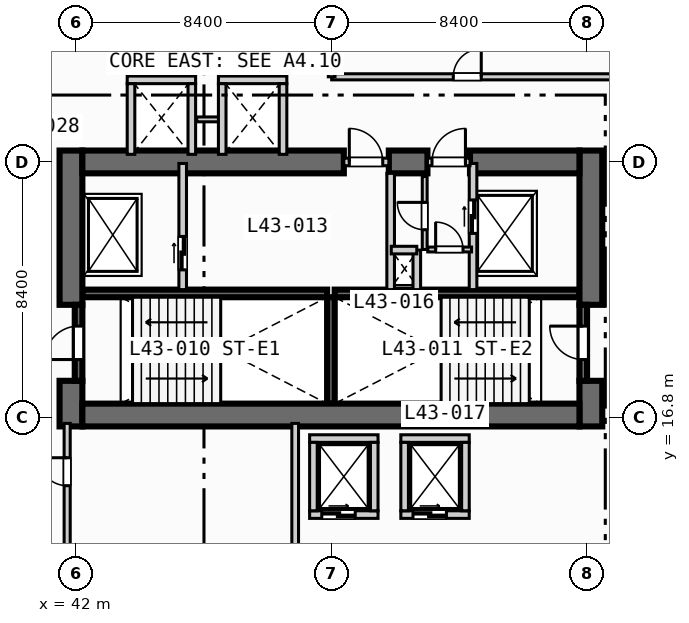
"""IFC4 building model, lengths in metres.
Left out: names, types, materials, properties, quantities, classifications, styles, units other than length and angle.
Written with IfcOpenShell. Run it as: python <this file> out.ifc"""

import sys

from ifc_helpers import new_model, si_unit, direction, frame, frame_2d, origin, place, context, subcontext, project, spatial, rectangle, extrude, element, fill, save


model = new_model("IFC4")
c1 = context("Model", 3, precision=1e-05, world=origin(), true_north=direction((0.0, 1.0)))
c2 = subcontext(c1, "Body", "Model", "MODEL_VIEW")
j1 = project(units=[si_unit("LENGTHUNIT", "METRE"), si_unit("PLANEANGLEUNIT", "RADIAN")], contexts=[c1])
p1 = place(None, origin())
s1 = spatial("IfcSite", under=j1, at=p1, CompositionType="ELEMENT")
p2 = place(p1, origin())
s2 = spatial("IfcBuilding", under=s1, at=p2, CompositionType="ELEMENT")
p3 = place(p2, frame((0.0, 0.0, 179.1)))
s3 = spatial("IfcBuildingStorey", under=s2, at=p3, CompositionType="ELEMENT", Elevation=179.1)
for number, where, z_axis, x_axis in (
    (1, (42.2, 20.875, 0.0), (0.0, 0.0, 1.0), (1.0, 0.0, 0.0)),
    (2, (50.5, 20.875, 0.0), (0.0, 0.0, 1.0), (1.0, 0.0, 0.0)),
):
    element("IfcWall", number, at=place(p3, frame(where, z_axis=z_axis, x_axis=x_axis)), inside=s3, PredefinedType="SOLIDWALL", context=c2, shape_type="SweptSolid", body=[
        extrude(rectangle(XDim=8.05, YDim=0.25, at=frame_2d((4.025, 0.0))), origin(), (0.0, 0.0, 1.0), 3.47),
    ])
p4 = place(p3, frame((50.375, 17.25, 0.0), z_axis=(0.0, 0.0, 1.0), x_axis=(0.0, 1.0, 0.0)))
e3 = element("IfcWall", 3, at=p4, inside=s3, PredefinedType="SOLIDWALL", context=c2, shape_type="SweptSolid", body=[
    extrude(rectangle(XDim=3.5, YDim=0.25, at=frame_2d((1.75, 0.0))), origin(), (0.0, 0.0, 1.0), 3.47),
])
p5 = place(p3, frame((41.825, 16.5, 0.0), z_axis=(0.0, 0.0, 1.0), x_axis=(0.0, 1.0, 0.0)))
e4 = element("IfcWall", 4, at=p5, inside=s3, PredefinedType="SHEAR", context=c2, shape_type="SweptSolid", body=[
    extrude(rectangle(XDim=1.5, YDim=0.75, at=frame_2d((0.75, 0.0))), origin(), (0.0, 0.0, 1.0), 3.47),
])
p6 = place(p3, frame((41.825, 20.5, 0.0), z_axis=(0.0, 0.0, 1.0), x_axis=(0.0, 1.0, 0.0)))
e5 = element("IfcWall", 5, at=p6, inside=s3, PredefinedType="SHEAR", context=c2, shape_type="SweptSolid", body=[
    extrude(rectangle(XDim=5.075, YDim=0.75, at=frame_2d((2.538, 0.0))), origin(), (0.0, 0.0, 1.0), 3.47),
])
p7 = place(p3, frame((58.925, 16.5, 0.0), z_axis=(0.0, 0.0, 1.0), x_axis=(0.0, 1.0, 0.0)))
e6 = element("IfcWall", 6, at=p7, inside=s3, PredefinedType="SHEAR", context=c2, shape_type="SweptSolid", body=[
    extrude(rectangle(XDim=1.5, YDim=0.75, at=frame_2d((0.75, 0.0))), origin(), (0.0, 0.0, 1.0), 3.47),
])
p8 = place(p3, frame((58.925, 20.5, 0.0), z_axis=(0.0, 0.0, 1.0), x_axis=(0.0, 1.0, 0.0)))
e7 = element("IfcWall", 7, at=p8, inside=s3, PredefinedType="SHEAR", context=c2, shape_type="SweptSolid", body=[
    extrude(rectangle(XDim=5.075, YDim=0.75, at=frame_2d((2.538, 0.0))), origin(), (0.0, 0.0, 1.0), 3.47),
])
p9 = place(p3, frame((42.2, 16.875, 0.0), z_axis=(0.0, 0.0, 1.0), x_axis=(1.0, 0.0, 0.0)))
e8 = element("IfcWall", 8, at=p9, inside=s3, PredefinedType="SHEAR", context=c2, shape_type="SweptSolid", body=[
    extrude(rectangle(XDim=16.35, YDim=0.75, at=frame_2d((8.175, 0.0))), origin(), (0.0, 0.0, 1.0), 3.47),
])
p10 = place(p3, frame((42.2, 25.2, 0.0), z_axis=(0.0, 0.0, 1.0), x_axis=(1.0, 0.0, 0.0)))
e9 = element("IfcWall", 9, at=p10, inside=s3, PredefinedType="SHEAR", context=c2, shape_type="SweptSolid", body=[
    extrude(rectangle(XDim=8.6, YDim=0.75, at=frame_2d((4.3, 0.0))), origin(), (0.0, 0.0, 1.0), 3.47),
])
p11 = place(p3, frame((52.28, 25.2, 0.0), z_axis=(0.0, 0.0, 1.0), x_axis=(1.0, 0.0, 0.0)))
e10 = element("IfcWall", 10, at=p11, inside=s3, PredefinedType="SHEAR", context=c2, shape_type="SweptSolid", body=[
    extrude(rectangle(XDim=1.27, YDim=0.75, at=frame_2d((0.635, 0.0))), origin(), (0.0, 0.0, 1.0), 3.47),
])
p12 = place(p3, frame((54.95, 25.2, 0.0), z_axis=(0.0, 0.0, 1.0), x_axis=(1.0, 0.0, 0.0)))
e11 = element("IfcWall", 11, at=p12, inside=s3, PredefinedType="SHEAR", context=c2, shape_type="SweptSolid", body=[
    extrude(rectangle(XDim=3.6, YDim=0.75, at=frame_2d((1.8, 0.0))), origin(), (0.0, 0.0, 1.0), 3.47),
])
p13 = place(p3, frame((42.075, 18.0, 0.0), z_axis=(0.0, 0.0, 1.0), x_axis=(0.0, 1.0, 0.0)))
e12 = element("IfcWall", 12, at=p13, inside=s3, PredefinedType="SOLIDWALL", context=c2, shape_type="SweptSolid", body=[
    extrude(rectangle(XDim=2.5, YDim=0.25, at=frame_2d((1.25, 0.0))), origin(), (0.0, 0.0, 1.0), 3.47),
])
p14 = place(p13, frame((0.7, 0.0, 0.0)))
e13 = element("IfcOpeningElement", 13, at=p14, cuts=e12, PredefinedType="OPENING", context=c2, shape_type="SweptSolid", body=[
    extrude(rectangle(XDim=1.1, YDim=2.15, at=frame_2d((0.55, 1.075))), frame((0.0, 0.135, 0.0), z_axis=(0.0, -1.0, 0.0), x_axis=(1.0, 0.0, 0.0)), (0.0, 0.0, 1.0), 0.27),
])
p15 = place(p3, frame((58.675, 18.0, 0.0), z_axis=(0.0, 0.0, 1.0), x_axis=(0.0, 1.0, 0.0)))
e14 = element("IfcWall", 14, at=p15, inside=s3, PredefinedType="SOLIDWALL", context=c2, shape_type="SweptSolid", body=[
    extrude(rectangle(XDim=2.5, YDim=0.25, at=frame_2d((1.25, 0.0))), origin(), (0.0, 0.0, 1.0), 3.47),
])
p16 = place(p15, frame((0.7, 0.0, 0.0)))
e15 = element("IfcOpeningElement", 15, at=p16, cuts=e14, PredefinedType="OPENING", context=c2, shape_type="SweptSolid", body=[
    extrude(rectangle(XDim=1.1, YDim=2.15, at=frame_2d((0.55, 1.075))), frame((0.0, 0.135, 0.0), z_axis=(0.0, -1.0, 0.0), x_axis=(1.0, 0.0, 0.0)), (0.0, 0.0, 1.0), 0.27),
])
p17 = place(p3, frame((45.5, 21.0, 0.0), z_axis=(0.0, 0.0, 1.0), x_axis=(0.0, 1.0, 0.0)))
e16 = element("IfcWall", 16, at=p17, inside=s3, PredefinedType="SOLIDWALL", context=c2, shape_type="SweptSolid", body=[
    extrude(rectangle(XDim=4.15, YDim=0.25, at=frame_2d((2.075, 0.0))), origin(), (0.0, 0.0, 1.0), 3.47),
])
p18 = place(p17, frame((0.65, 0.0, 0.0)))
e17 = element("IfcOpeningElement", 17, at=p18, cuts=e16, PredefinedType="OPENING", context=c2, shape_type="SweptSolid", body=[
    extrude(rectangle(XDim=1.1, YDim=2.15, at=frame_2d((0.55, 1.075))), frame((0.0, 0.135, 0.0), z_axis=(0.0, -1.0, 0.0), x_axis=(1.0, 0.0, 0.0)), (0.0, 0.0, 1.0), 0.27),
])
p19 = place(p3, frame((50.8, 25.2, 0.0), z_axis=(0.0, 0.0, 1.0), x_axis=(1.0, 0.0, 0.0)))
e18 = element("IfcWall", 18, at=p19, inside=s3, PredefinedType="SOLIDWALL", context=c2, shape_type="SweptSolid", body=[
    extrude(rectangle(XDim=1.48, YDim=0.25, at=frame_2d((0.74, 0.0))), origin(), (0.0, 0.0, 1.0), 3.47),
])
p20 = place(p19, frame((0.18, 0.0, 0.0)))
e19 = element("IfcOpeningElement", 19, at=p20, cuts=e18, PredefinedType="OPENING", context=c2, shape_type="SweptSolid", body=[
    extrude(rectangle(XDim=1.1, YDim=2.15, at=frame_2d((0.55, 1.075))), frame((0.0, 0.135, 0.0), z_axis=(0.0, -1.0, 0.0), x_axis=(1.0, 0.0, 0.0)), (0.0, 0.0, 1.0), 0.27),
])
p21 = place(p3, frame((52.34, 21.0, 0.0), z_axis=(0.0, 0.0, 1.0), x_axis=(0.0, 1.0, 0.0)))
e20 = element("IfcWall", 20, at=p21, inside=s3, PredefinedType="SOLIDWALL", context=c2, shape_type="SweptSolid", body=[
    extrude(rectangle(XDim=3.825, YDim=0.25, at=frame_2d((1.913, 0.0))), origin(), (0.0, 0.0, 1.0), 3.47),
])
p22 = place(p3, frame((55.05, 21.0, 0.0), z_axis=(0.0, 0.0, 1.0), x_axis=(0.0, 1.0, 0.0)))
e21 = element("IfcWall", 21, at=p22, inside=s3, PredefinedType="SOLIDWALL", context=c2, shape_type="SweptSolid", body=[
    extrude(rectangle(XDim=4.15, YDim=0.25, at=frame_2d((2.075, 0.0))), origin(), (0.0, 0.0, 1.0), 3.47),
])
p23 = place(p22, frame((1.85, 0.0, 0.0)))
e22 = element("IfcOpeningElement", 22, at=p23, cuts=e21, PredefinedType="OPENING", context=c2, shape_type="SweptSolid", body=[
    extrude(rectangle(XDim=1.1, YDim=2.15, at=frame_2d((0.55, 1.075))), frame((0.0, 0.135, 0.0), z_axis=(0.0, -1.0, 0.0), x_axis=(1.0, 0.0, 0.0)), (0.0, 0.0, 1.0), 0.27),
])
p24 = place(p3, frame((53.55, 25.2, 0.0), z_axis=(0.0, 0.0, 1.0), x_axis=(1.0, 0.0, 0.0)))
e23 = element("IfcWall", 23, at=p24, inside=s3, PredefinedType="SOLIDWALL", context=c2, shape_type="SweptSolid", body=[
    extrude(rectangle(XDim=1.4, YDim=0.25, at=frame_2d((0.7, 0.0))), origin(), (0.0, 0.0, 1.0), 3.47),
])
p25 = place(p24, frame((0.15, 0.0, 0.0)))
e24 = element("IfcOpeningElement", 24, at=p25, cuts=e23, PredefinedType="OPENING", context=c2, shape_type="SweptSolid", body=[
    extrude(rectangle(XDim=1.1, YDim=2.15, at=frame_2d((0.55, 1.075))), frame((0.0, 0.135, 0.0), z_axis=(0.0, -1.0, 0.0), x_axis=(1.0, 0.0, 0.0)), (0.0, 0.0, 1.0), 0.27),
])
p26 = place(p3, frame((53.2, 21.0, 0.0), z_axis=(0.0, 0.0, 1.0), x_axis=(0.0, 1.0, 0.0)))
e25 = element("IfcWall", 25, at=p26, inside=s3, PredefinedType="SOLIDWALL", context=c2, shape_type="SweptSolid", body=[
    extrude(rectangle(XDim=1.3, YDim=0.25, at=frame_2d((0.65, 0.0))), origin(), (0.0, 0.0, 1.0), 3.47),
])
p27 = place(p3, frame((52.36, 22.3, 0.0), z_axis=(0.0, 0.0, 1.0), x_axis=(1.0, 0.0, 0.0)))
e26 = element("IfcWall", 26, at=p27, inside=s3, PredefinedType="SOLIDWALL", context=c2, shape_type="SweptSolid", body=[
    extrude(rectangle(XDim=0.84, YDim=0.25, at=frame_2d((0.42, 0.0))), origin(), (0.0, 0.0, 1.0), 3.47),
])
p28 = place(p3, frame((53.56, 22.32, 0.0), z_axis=(0.0, 0.0, 1.0), x_axis=(1.0, 0.0, 0.0)))
e27 = element("IfcWall", 27, at=p28, inside=s3, PredefinedType="PARTITIONING", context=c2, shape_type="SweptSolid", body=[
    extrude(rectangle(XDim=1.44, YDim=0.16, at=frame_2d((0.72, 0.0))), origin(), (0.0, 0.0, 1.0), 3.47),
])
p29 = place(p28, frame((0.26, 0.0, 0.0)))
e28 = element("IfcOpeningElement", 28, at=p29, cuts=e27, PredefinedType="OPENING", context=c2, shape_type="SweptSolid", body=[
    extrude(rectangle(XDim=0.9, YDim=2.1, at=frame_2d((0.45, 1.05))), frame((0.0, 0.09, 0.0), z_axis=(0.0, -1.0, 0.0), x_axis=(1.0, 0.0, 0.0)), (0.0, 0.0, 1.0), 0.18),
])
p30 = place(p3, frame((53.46, 22.32, 0.0), z_axis=(0.0, 0.0, 1.0), x_axis=(0.0, 1.0, 0.0)))
e29 = element("IfcWall", 29, at=p30, inside=s3, PredefinedType="PARTITIONING", context=c2, shape_type="SweptSolid", body=[
    extrude(rectangle(XDim=2.4, YDim=0.16, at=frame_2d((1.2, 0.0))), origin(), (0.0, 0.0, 1.0), 3.47),
])
p31 = place(p30, frame((0.65, 0.0, 0.0)))
e30 = element("IfcOpeningElement", 30, at=p31, cuts=e29, PredefinedType="OPENING", context=c2, shape_type="SweptSolid", body=[
    extrude(rectangle(XDim=0.9, YDim=2.1, at=frame_2d((0.45, 1.05))), frame((0.0, 0.09, 0.0), z_axis=(0.0, -1.0, 0.0), x_axis=(1.0, 0.0, 0.0)), (0.0, 0.0, 1.0), 0.18),
])
p32 = place(p3, frame((49.675, 13.6, 0.0), z_axis=(0.0, 0.0, 1.0), x_axis=(1.0, 0.0, 0.0)))
e31 = element("IfcWall", 31, at=p32, inside=s3, PredefinedType="SOLIDWALL", context=c2, shape_type="SweptSolid", body=[
    extrude(rectangle(XDim=2.25, YDim=0.25, at=frame_2d((1.125, 0.0))), origin(), (0.0, 0.0, 1.0), 3.47),
])
p33 = place(p32, frame((0.4, 0.0, 0.0)))
e32 = element("IfcOpeningElement", 32, at=p33, cuts=e31, PredefinedType="OPENING", context=c2, shape_type="SweptSolid", body=[
    extrude(rectangle(XDim=1.1, YDim=2.15, at=frame_2d((0.55, 1.075))), frame((0.0, 0.135, 0.0), z_axis=(0.0, -1.0, 0.0), x_axis=(1.0, 0.0, 0.0)), (0.0, 0.0, 1.0), 0.27),
])
for number, where, z_axis, x_axis in (
    (33, (49.675, 16.1, 0.0), (0.0, 0.0, 1.0), (1.0, 0.0, 0.0)),
    (34, (49.8, 13.725, 0.0), (0.0, 0.0, 1.0), (0.0, 1.0, 0.0)),
    (35, (51.8, 13.725, 0.0), (0.0, 0.0, 1.0), (0.0, 1.0, 0.0)),
):
    element("IfcWall", number, at=place(p3, frame(where, z_axis=z_axis, x_axis=x_axis)), inside=s3, PredefinedType="SOLIDWALL", context=c2, shape_type="SweptSolid", body=[
        extrude(rectangle(XDim=2.25, YDim=0.25, at=frame_2d((1.125, 0.0))), origin(), (0.0, 0.0, 1.0), 3.47),
    ])
p34 = place(p3, frame((52.675, 13.6, 0.0), z_axis=(0.0, 0.0, 1.0), x_axis=(1.0, 0.0, 0.0)))
e36 = element("IfcWall", 36, at=p34, inside=s3, PredefinedType="SOLIDWALL", context=c2, shape_type="SweptSolid", body=[
    extrude(rectangle(XDim=2.25, YDim=0.25, at=frame_2d((1.125, 0.0))), origin(), (0.0, 0.0, 1.0), 3.47),
])
p35 = place(p34, frame((0.4, 0.0, 0.0)))
e37 = element("IfcOpeningElement", 37, at=p35, cuts=e36, PredefinedType="OPENING", context=c2, shape_type="SweptSolid", body=[
    extrude(rectangle(XDim=1.1, YDim=2.15, at=frame_2d((0.55, 1.075))), frame((0.0, 0.135, 0.0), z_axis=(0.0, -1.0, 0.0), x_axis=(1.0, 0.0, 0.0)), (0.0, 0.0, 1.0), 0.27),
])
for number, where, z_axis, x_axis in (
    (38, (52.675, 16.1, 0.0), (0.0, 0.0, 1.0), (1.0, 0.0, 0.0)),
    (39, (52.8, 13.725, 0.0), (0.0, 0.0, 1.0), (0.0, 1.0, 0.0)),
    (40, (54.8, 13.725, 0.0), (0.0, 0.0, 1.0), (0.0, 1.0, 0.0)),
    (41, (43.675, 27.9, 0.0), (0.0, 0.0, 1.0), (1.0, 0.0, 0.0)),
):
    element("IfcWall", number, at=place(p3, frame(where, z_axis=z_axis, x_axis=x_axis)), inside=s3, PredefinedType="SOLIDWALL", context=c2, shape_type="SweptSolid", body=[
        extrude(rectangle(XDim=2.25, YDim=0.25, at=frame_2d((1.125, 0.0))), origin(), (0.0, 0.0, 1.0), 3.47),
    ])
for number, where, z_axis, x_axis in (
    (42, (43.8, 25.45, 0.0), (0.0, 0.0, 1.0), (0.0, 1.0, 0.0)),
    (43, (45.8, 25.45, 0.0), (0.0, 0.0, 1.0), (0.0, 1.0, 0.0)),
):
    element("IfcWall", number, at=place(p3, frame(where, z_axis=z_axis, x_axis=x_axis)), inside=s3, PredefinedType="SOLIDWALL", context=c2, shape_type="SweptSolid", body=[
        extrude(rectangle(XDim=2.325, YDim=0.25, at=frame_2d((1.163, 0.0))), origin(), (0.0, 0.0, 1.0), 3.47),
    ])
p36 = place(p3, frame((45.96, 26.6, 0.0), z_axis=(0.0, 0.0, 1.0), x_axis=(1.0, 0.0, 0.0)))
e44 = element("IfcWall", 44, at=p36, inside=s3, PredefinedType="PARTITIONING", context=c2, shape_type="SweptSolid", body=[
    extrude(rectangle(XDim=0.88, YDim=0.16, at=frame_2d((0.44, 0.0))), origin(), (0.0, 0.0, 1.0), 3.47),
])
p37 = place(p3, frame((46.675, 27.9, 0.0), z_axis=(0.0, 0.0, 1.0), x_axis=(1.0, 0.0, 0.0)))
e45 = element("IfcWall", 45, at=p37, inside=s3, PredefinedType="SOLIDWALL", context=c2, shape_type="SweptSolid", body=[
    extrude(rectangle(XDim=2.25, YDim=0.25, at=frame_2d((1.125, 0.0))), origin(), (0.0, 0.0, 1.0), 3.47),
])
for number, where, z_axis, x_axis in (
    (46, (46.8, 25.45, 0.0), (0.0, 0.0, 1.0), (0.0, 1.0, 0.0)),
    (47, (48.8, 25.45, 0.0), (0.0, 0.0, 1.0), (0.0, 1.0, 0.0)),
):
    element("IfcWall", number, at=place(p3, frame(where, z_axis=z_axis, x_axis=x_axis)), inside=s3, PredefinedType="SOLIDWALL", context=c2, shape_type="SweptSolid", body=[
        extrude(rectangle(XDim=2.325, YDim=0.25, at=frame_2d((1.163, 0.0))), origin(), (0.0, 0.0, 1.0), 3.47),
    ])
p38 = place(p3, frame((41.7, 0.35, 0.0), z_axis=(0.0, 0.0, 1.0), x_axis=(0.0, 1.0, 0.0)))
e48 = element("IfcWall", 48, at=p38, inside=s3, PredefinedType="PARTITIONING", context=c2, shape_type="SweptSolid", body=[
    extrude(rectangle(XDim=16.25, YDim=0.2, at=frame_2d((8.125, 0.0))), origin(), (0.0, 0.0, 1.0), 2.82),
])
p39 = place(p38, frame((14.2, 0.0, 0.0)))
e49 = element("IfcOpeningElement", 49, at=p39, cuts=e48, PredefinedType="OPENING", context=c2, shape_type="SweptSolid", body=[
    extrude(rectangle(XDim=0.92, YDim=2.1, at=frame_2d((0.46, 1.05))), frame((0.0, 0.11, 0.0), z_axis=(0.0, -1.0, 0.0), x_axis=(1.0, 0.0, 0.0)), (0.0, 0.0, 1.0), 0.22),
])
p40 = place(p3, frame((49.2, 0.35, 0.0), z_axis=(0.0, 0.0, 1.0), x_axis=(0.0, 1.0, 0.0)))
e50 = element("IfcWall", 50, at=p40, inside=s3, PredefinedType="PARTITIONING", context=c2, shape_type="SweptSolid", body=[
    extrude(rectangle(XDim=16.25, YDim=0.22, at=frame_2d((8.125, 0.0))), origin(), (0.0, 0.0, 1.0), 3.47),
])
p41 = place(p3, frame((50.4, 28.0, 0.0), z_axis=(0.0, 0.0, 1.0), x_axis=(1.0, 0.0, 0.0)))
e51 = element("IfcWall", 51, at=p41, inside=s3, PredefinedType="PARTITIONING", context=c2, shape_type="SweptSolid", body=[
    extrude(rectangle(XDim=21.8, YDim=0.2, at=frame_2d((10.9, 0.0))), origin(), (0.0, 0.0, 1.0), 3.47),
])
p42 = place(p41, frame((4.0, 0.0, 0.0)))
e52 = element("IfcOpeningElement", 52, at=p42, cuts=e51, PredefinedType="OPENING", context=c2, shape_type="SweptSolid", body=[
    extrude(rectangle(XDim=0.92, YDim=2.1, at=frame_2d((0.46, 1.05))), frame((0.0, 0.11, 0.0), z_axis=(0.0, -1.0, 0.0), x_axis=(1.0, 0.0, 0.0)), (0.0, 0.0, 1.0), 0.22),
])
p43 = place(p3, frame((50.4, 28.0, 0.0), z_axis=(0.0, 0.0, 1.0), x_axis=(0.0, 1.0, 0.0)))
e53 = element("IfcWall", 53, at=p43, inside=s3, PredefinedType="PARTITIONING", context=c2, shape_type="SweptSolid", body=[
    extrude(rectangle(XDim=5.3, YDim=0.22, at=frame_2d((2.65, 0.0))), origin(), (0.0, 0.0, 1.0), 3.053),
])
p44 = place(p14, origin())
e54 = element("IfcDoor", 54, at=p44, inside=s3, OperationType="SINGLE_SWING_LEFT", PredefinedType="DOOR", context=c2, shape_type="SweptSolid", body=[
    extrude(rectangle(XDim=1.1, YDim=2.15, at=frame_2d((0.55, 1.075))), frame((0.0, 0.025, 0.0), z_axis=(0.0, -1.0, 0.0), x_axis=(1.0, 0.0, 0.0)), (0.0, 0.0, 1.0), 0.05),
])
fill(e13, e54)
p45 = place(p16, origin())
e55 = element("IfcDoor", 55, at=p45, inside=s3, OperationType="SINGLE_SWING_RIGHT", PredefinedType="DOOR", context=c2, shape_type="SweptSolid", body=[
    extrude(rectangle(XDim=1.1, YDim=2.15, at=frame_2d((0.55, 1.075))), frame((0.0, 0.025, 0.0), z_axis=(0.0, -1.0, 0.0), x_axis=(1.0, 0.0, 0.0)), (0.0, 0.0, 1.0), 0.05),
])
fill(e15, e55)
p46 = place(p18, origin())
e56 = element("IfcDoor", 56, at=p46, inside=s3, OperationType="SLIDING_TO_LEFT", PredefinedType="DOOR", context=c2, shape_type="SweptSolid", body=[
    extrude(rectangle(XDim=1.1, YDim=2.15, at=frame_2d((0.55, 1.075))), frame((0.0, 0.025, 0.0), z_axis=(0.0, -1.0, 0.0), x_axis=(1.0, 0.0, 0.0)), (0.0, 0.0, 1.0), 0.05),
])
fill(e17, e56)
p47 = place(p20, origin())
e57 = element("IfcDoor", 57, at=p47, inside=s3, OperationType="SINGLE_SWING_LEFT", PredefinedType="DOOR", context=c2, shape_type="SweptSolid", body=[
    extrude(rectangle(XDim=1.1, YDim=2.15, at=frame_2d((0.55, 1.075))), frame((0.0, 0.025, 0.0), z_axis=(0.0, -1.0, 0.0), x_axis=(1.0, 0.0, 0.0)), (0.0, 0.0, 1.0), 0.05),
])
fill(e19, e57)
p48 = place(p23, origin())
e58 = element("IfcDoor", 58, at=p48, inside=s3, OperationType="SLIDING_TO_LEFT", PredefinedType="DOOR", context=c2, shape_type="SweptSolid", body=[
    extrude(rectangle(XDim=1.1, YDim=2.15, at=frame_2d((0.55, 1.075))), frame((0.0, 0.025, 0.0), z_axis=(0.0, -1.0, 0.0), x_axis=(1.0, 0.0, 0.0)), (0.0, 0.0, 1.0), 0.05),
])
fill(e22, e58)
p49 = place(p25, origin())
e59 = element("IfcDoor", 59, at=p49, inside=s3, OperationType="SINGLE_SWING_RIGHT", PredefinedType="DOOR", context=c2, shape_type="SweptSolid", body=[
    extrude(rectangle(XDim=1.1, YDim=2.15, at=frame_2d((0.55, 1.075))), frame((0.0, 0.025, 0.0), z_axis=(0.0, -1.0, 0.0), x_axis=(1.0, 0.0, 0.0)), (0.0, 0.0, 1.0), 0.05),
])
fill(e24, e59)
p50 = place(p29, origin())
e60 = element("IfcDoor", 60, at=p50, inside=s3, OperationType="SINGLE_SWING_LEFT", PredefinedType="DOOR", context=c2, shape_type="SweptSolid", body=[
    extrude(rectangle(XDim=0.9, YDim=2.1, at=frame_2d((0.45, 1.05))), frame((0.0, 0.025, 0.0), z_axis=(0.0, -1.0, 0.0), x_axis=(1.0, 0.0, 0.0)), (0.0, 0.0, 1.0), 0.05),
])
fill(e28, e60)
p51 = place(p31, origin())
e61 = element("IfcDoor", 61, at=p51, inside=s3, OperationType="SINGLE_SWING_RIGHT", PredefinedType="DOOR", context=c2, shape_type="SweptSolid", body=[
    extrude(rectangle(XDim=0.9, YDim=2.1, at=frame_2d((0.45, 1.05))), frame((0.0, 0.025, 0.0), z_axis=(0.0, -1.0, 0.0), x_axis=(1.0, 0.0, 0.0)), (0.0, 0.0, 1.0), 0.05),
])
fill(e30, e61)
p52 = place(p33, origin())
e62 = element("IfcDoor", 62, at=p52, inside=s3, OperationType="SLIDING_TO_LEFT", PredefinedType="DOOR", context=c2, shape_type="SweptSolid", body=[
    extrude(rectangle(XDim=1.1, YDim=2.15, at=frame_2d((0.55, 1.075))), frame((0.0, 0.025, 0.0), z_axis=(0.0, -1.0, 0.0), x_axis=(1.0, 0.0, 0.0)), (0.0, 0.0, 1.0), 0.05),
])
fill(e32, e62)
p53 = place(p35, origin())
e63 = element("IfcDoor", 63, at=p53, inside=s3, OperationType="SLIDING_TO_LEFT", PredefinedType="DOOR", context=c2, shape_type="SweptSolid", body=[
    extrude(rectangle(XDim=1.1, YDim=2.15, at=frame_2d((0.55, 1.075))), frame((0.0, 0.025, 0.0), z_axis=(0.0, -1.0, 0.0), x_axis=(1.0, 0.0, 0.0)), (0.0, 0.0, 1.0), 0.05),
])
fill(e37, e63)
p54 = place(p39, origin())
e64 = element("IfcDoor", 64, at=p54, inside=s3, OperationType="SINGLE_SWING_RIGHT", PredefinedType="DOOR", context=c2, shape_type="SweptSolid", body=[
    extrude(rectangle(XDim=0.92, YDim=2.1, at=frame_2d((0.46, 1.05))), frame((0.0, 0.025, 0.0), z_axis=(0.0, -1.0, 0.0), x_axis=(1.0, 0.0, 0.0)), (0.0, 0.0, 1.0), 0.05),
])
fill(e49, e64)
p55 = place(p42, origin())
e65 = element("IfcDoor", 65, at=p55, inside=s3, OperationType="SINGLE_SWING_RIGHT", PredefinedType="DOOR", context=c2, shape_type="SweptSolid", body=[
    extrude(rectangle(XDim=0.92, YDim=2.1, at=frame_2d((0.46, 1.05))), frame((0.0, 0.025, 0.0), z_axis=(0.0, -1.0, 0.0), x_axis=(1.0, 0.0, 0.0)), (0.0, 0.0, 1.0), 0.05),
])
fill(e52, e65)
save(model, sys.argv[1])
